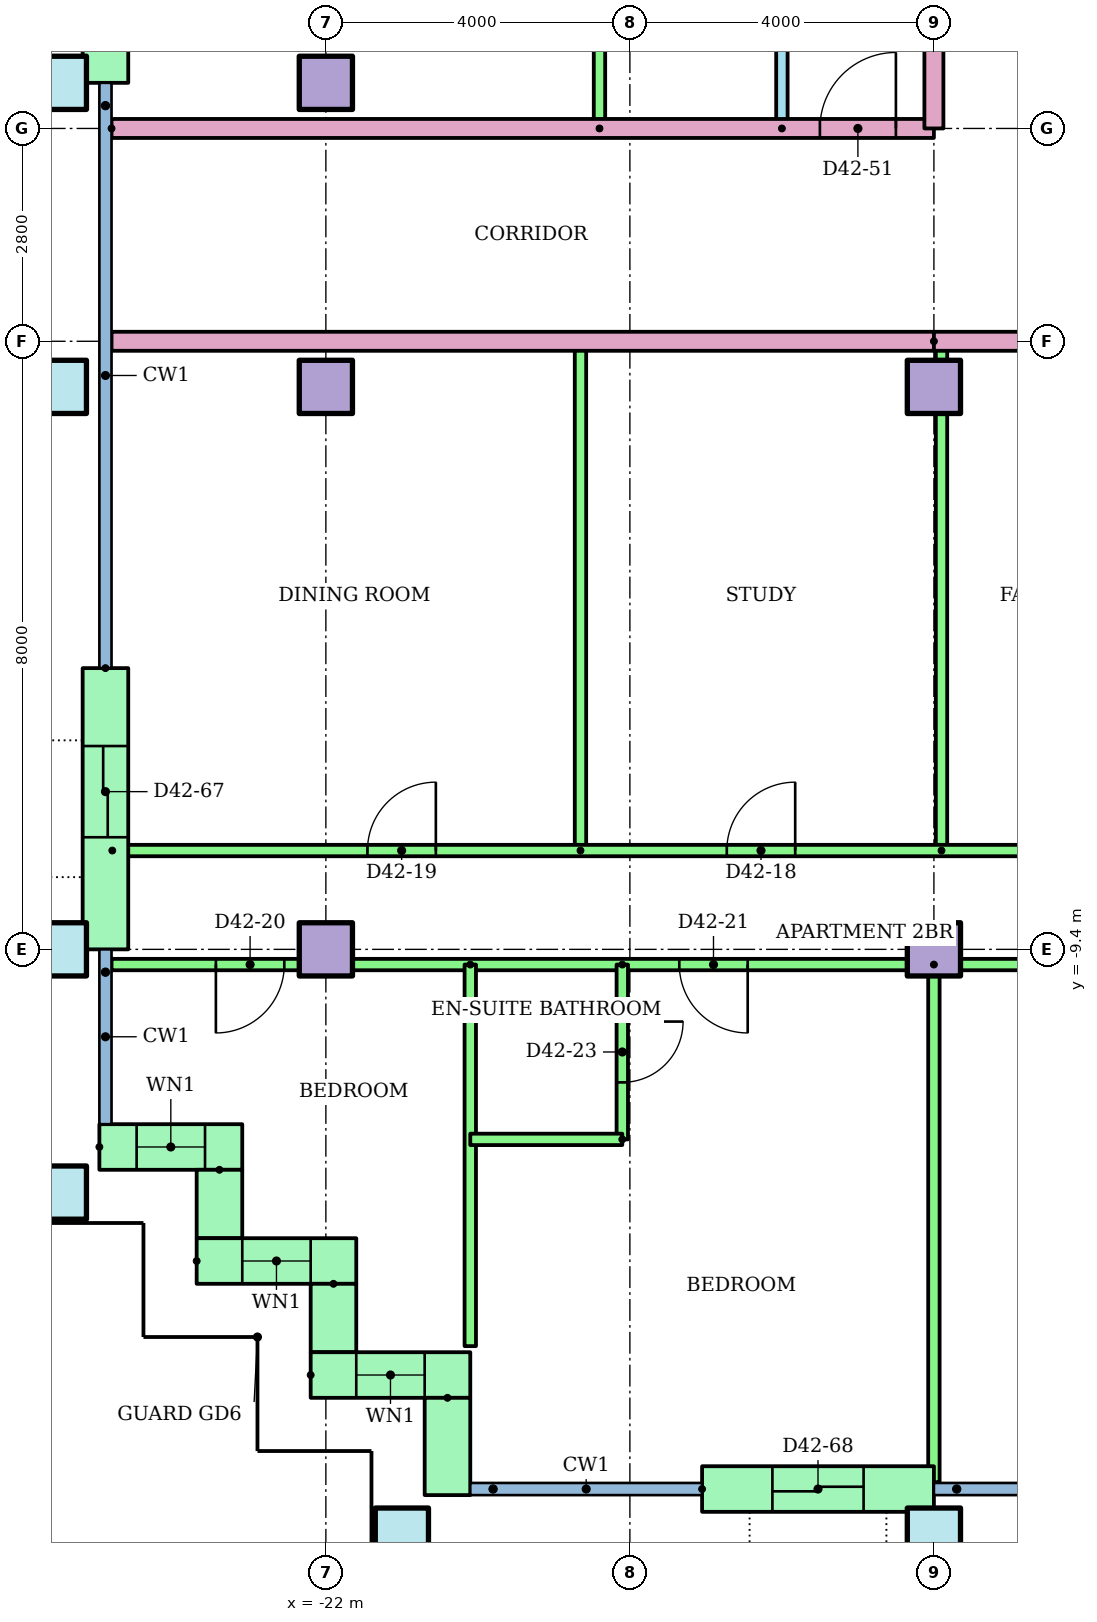
"""IFC4 building model, lengths in metres.
Left out: names, types, materials, properties, quantities, classifications, styles, units other than length and angle.
Written with IfcOpenShell. Run it as: python <this file> out.ifc"""

import sys

from ifc_helpers import new_model, si_unit, direction, frame, frame_2d, origin, origin_2d, place, context, subcontext, project, spatial, rectangle, hollow_rectangle, extrude, element, fill, save


model = new_model("IFC4")
c1 = context("Model", 3, precision=1e-05, world=origin(), true_north=direction((0.0, 1.0)))
c2 = subcontext(c1, "Body", "Model", "MODEL_VIEW")
j1 = project(units=[si_unit("LENGTHUNIT", "METRE"), si_unit("PLANEANGLEUNIT", "RADIAN")], contexts=[c1])
p1 = place(None, origin())
s1 = spatial("IfcSite", under=j1, at=p1, CompositionType="ELEMENT")
p2 = place(p1, origin())
s2 = spatial("IfcBuilding", under=s1, at=p2, CompositionType="ELEMENT")
p3 = place(p2, frame((0.0, 0.0, 165.3)))
s3 = spatial("IfcBuildingStorey", under=s2, at=p3, CompositionType="ELEMENT", Elevation=165.3)
for number, where in (
    (1, (-21.0, -17.1, 0.0)),
    (2, (-14.0, -17.1, 0.0)),
    (3, (-25.5, -12.6, 0.0)),
    (4, (-25.5, -9.4, 0.0)),
):
    element("IfcColumn", number, at=place(p3, frame(where)), inside=s3, PredefinedType="COLUMN", context=c2, shape_type="SweptSolid", body=[
        extrude(hollow_rectangle(XDim=0.7, YDim=0.7, WallThickness=0.036, at=origin_2d()), origin(), (0.0, 0.0, 1.0), 3.2),
    ])
for number, where in (
    (5, (-22.0, -9.4, 0.0)),
    (6, (-14.0, -9.4, 0.0)),
):
    element("IfcColumn", number, at=place(p3, frame(where)), inside=s3, PredefinedType="COLUMN", context=c2, shape_type="SweptSolid", body=[
        extrude(rectangle(XDim=0.7, YDim=0.7, at=origin_2d()), origin(), (0.0, 0.0, 1.0), 3.2),
    ])
p4 = place(p3, frame((-25.5, -2.0, 0.0)))
e7 = element("IfcColumn", 7, at=p4, inside=s3, PredefinedType="COLUMN", context=c2, shape_type="SweptSolid", body=[
    extrude(hollow_rectangle(XDim=0.7, YDim=0.7, WallThickness=0.036, at=origin_2d()), origin(), (0.0, 0.0, 1.0), 3.2),
])
for number, where in (
    (8, (-22.0, -2.0, 0.0)),
    (9, (-14.0, -2.0, 0.0)),
):
    element("IfcColumn", number, at=place(p3, frame(where)), inside=s3, PredefinedType="COLUMN", context=c2, shape_type="SweptSolid", body=[
        extrude(rectangle(XDim=0.7, YDim=0.7, at=origin_2d()), origin(), (0.0, 0.0, 1.0), 3.2),
    ])
p5 = place(p3, frame((-25.5, 2.0, 0.0)))
e10 = element("IfcColumn", 10, at=p5, inside=s3, PredefinedType="COLUMN", context=c2, shape_type="SweptSolid", body=[
    extrude(hollow_rectangle(XDim=0.7, YDim=0.7, WallThickness=0.036, at=origin_2d()), origin(), (0.0, 0.0, 1.0), 3.2),
])
p6 = place(p3, frame((-22.0, 2.0, 0.0)))
e11 = element("IfcColumn", 11, at=p6, inside=s3, PredefinedType="COLUMN", context=c2, shape_type="SweptSolid", body=[
    extrude(rectangle(XDim=0.7, YDim=0.7, at=origin_2d()), origin(), (0.0, 0.0, 1.0), 3.2),
])
p7 = place(p3, frame((-24.9, 6.5, 0.0), z_axis=(0.0, 0.0, 1.0), x_axis=(0.0, -1.0, 0.0)))
e12 = element("IfcWall", 12, at=p7, inside=s3, PredefinedType="STANDARD", context=c2, shape_type="SweptSolid", body=[
    extrude(rectangle(XDim=4.5, YDim=0.6, at=frame_2d((2.25, 0.0))), origin(), (0.0, 0.0, 1.0), 2.92),
])
p8 = place(p7, frame((1.65, 0.0, 0.0)))
e13 = element("IfcOpeningElement", 13, at=p8, cuts=e12, PredefinedType="OPENING", context=c2, shape_type="SweptSolid", body=[
    extrude(rectangle(XDim=1.2, YDim=2.1, at=frame_2d((0.6, 1.05))), frame((0.0, 0.31, 0.0), z_axis=(0.0, -1.0, 0.0), x_axis=(1.0, 0.0, 0.0)), (0.0, 0.0, 1.0), 0.62),
])
p9 = place(p3, frame((-24.9, -5.7, 0.0), z_axis=(0.0, 0.0, 1.0), x_axis=(0.0, -1.0, 0.0)))
e14 = element("IfcWall", 14, at=p9, inside=s3, PredefinedType="STANDARD", context=c2, shape_type="SweptSolid", body=[
    extrude(rectangle(XDim=3.7, YDim=0.6, at=frame_2d((1.85, 0.0))), origin(), (0.0, 0.0, 1.0), 2.92),
])
p10 = place(p9, frame((1.025, 0.0, 0.0)))
e15 = element("IfcOpeningElement", 15, at=p10, cuts=e14, PredefinedType="OPENING", context=c2, shape_type="SweptSolid", body=[
    extrude(rectangle(XDim=1.2, YDim=2.1, at=frame_2d((0.6, 1.05))), frame((0.0, 0.31, 0.0), z_axis=(0.0, -1.0, 0.0), x_axis=(1.0, 0.0, 0.0)), (0.0, 0.0, 1.0), 0.62),
])
p11 = place(p3, frame((-24.98, -12.0, 0.0)))
e16 = element("IfcWall", 16, at=p11, inside=s3, PredefinedType="STANDARD", context=c2, shape_type="SweptSolid", body=[
    extrude(rectangle(XDim=1.88, YDim=0.6, at=frame_2d((0.94, 0.0))), origin(), (0.0, 0.0, 1.0), 2.92),
])
p12 = place(p11, frame((0.49, 0.0, 0.9)))
e17 = element("IfcOpeningElement", 17, at=p12, cuts=e16, PredefinedType="OPENING", context=c2, shape_type="SweptSolid", body=[
    extrude(rectangle(XDim=0.9, YDim=1.5, at=frame_2d((0.45, 0.75))), frame((0.0, 0.31, 0.0), z_axis=(0.0, -1.0, 0.0), x_axis=(1.0, 0.0, 0.0)), (0.0, 0.0, 1.0), 0.62),
])
p13 = place(p3, frame((-23.4, -12.3, 0.0), z_axis=(0.0, 0.0, 1.0), x_axis=(0.0, -1.0, 0.0)))
e18 = element("IfcWall", 18, at=p13, inside=s3, PredefinedType="STANDARD", context=c2, shape_type="SweptSolid", body=[
    extrude(rectangle(XDim=0.9, YDim=0.6, at=frame_2d((0.45, 0.0))), origin(), (0.0, 0.0, 1.0), 2.92),
])
p14 = place(p3, frame((-23.7, -13.5, 0.0)))
e19 = element("IfcWall", 19, at=p14, inside=s3, PredefinedType="STANDARD", context=c2, shape_type="SweptSolid", body=[
    extrude(rectangle(XDim=2.1, YDim=0.6, at=frame_2d((1.05, 0.0))), origin(), (0.0, 0.0, 1.0), 2.92),
])
p15 = place(p14, frame((0.6, 0.0, 0.9)))
e20 = element("IfcOpeningElement", 20, at=p15, cuts=e19, PredefinedType="OPENING", context=c2, shape_type="SweptSolid", body=[
    extrude(rectangle(XDim=0.9, YDim=1.5, at=frame_2d((0.45, 0.75))), frame((0.0, 0.31, 0.0), z_axis=(0.0, -1.0, 0.0), x_axis=(1.0, 0.0, 0.0)), (0.0, 0.0, 1.0), 0.62),
])
p16 = place(p3, frame((-21.9, -13.8, 0.0), z_axis=(0.0, 0.0, 1.0), x_axis=(0.0, -1.0, 0.0)))
e21 = element("IfcWall", 21, at=p16, inside=s3, PredefinedType="STANDARD", context=c2, shape_type="SweptSolid", body=[
    extrude(rectangle(XDim=0.9, YDim=0.6, at=frame_2d((0.45, 0.0))), origin(), (0.0, 0.0, 1.0), 2.92),
])
p17 = place(p3, frame((-22.2, -15.0, 0.0)))
e22 = element("IfcWall", 22, at=p17, inside=s3, PredefinedType="STANDARD", context=c2, shape_type="SweptSolid", body=[
    extrude(rectangle(XDim=2.1, YDim=0.6, at=frame_2d((1.05, 0.0))), origin(), (0.0, 0.0, 1.0), 2.92),
])
p18 = place(p17, frame((0.6, 0.0, 0.9)))
e23 = element("IfcOpeningElement", 23, at=p18, cuts=e22, PredefinedType="OPENING", context=c2, shape_type="SweptSolid", body=[
    extrude(rectangle(XDim=0.9, YDim=1.5, at=frame_2d((0.45, 0.75))), frame((0.0, 0.31, 0.0), z_axis=(0.0, -1.0, 0.0), x_axis=(1.0, 0.0, 0.0)), (0.0, 0.0, 1.0), 0.62),
])
p19 = place(p3, frame((-20.4, -15.3, 0.0), z_axis=(0.0, 0.0, 1.0), x_axis=(0.0, -1.0, 0.0)))
e24 = element("IfcWall", 24, at=p19, inside=s3, PredefinedType="STANDARD", context=c2, shape_type="SweptSolid", body=[
    extrude(rectangle(XDim=1.28, YDim=0.6, at=frame_2d((0.64, 0.0))), origin(), (0.0, 0.0, 1.0), 2.92),
])
p20 = place(p3, frame((-17.05, -16.5, 0.0)))
e25 = element("IfcWall", 25, at=p20, inside=s3, PredefinedType="STANDARD", context=c2, shape_type="SweptSolid", body=[
    extrude(rectangle(XDim=3.05, YDim=0.6, at=frame_2d((1.525, 0.0))), origin(), (0.0, 0.0, 1.0), 2.92),
])
p21 = place(p20, frame((0.925, 0.0, 0.0)))
e26 = element("IfcOpeningElement", 26, at=p21, cuts=e25, PredefinedType="OPENING", context=c2, shape_type="SweptSolid", body=[
    extrude(rectangle(XDim=1.2, YDim=2.1, at=frame_2d((0.6, 1.05))), frame((0.0, 0.31, 0.0), z_axis=(0.0, -1.0, 0.0), x_axis=(1.0, 0.0, 0.0)), (0.0, 0.0, 1.0), 0.62),
])
for number, where, z_axis, x_axis in (
    (27, (-13.9, -8.1, 0.0), (0.0, 0.0, 1.0), (0.0, 1.0, 0.0)),
    (28, (-18.65, -8.1, 0.0), (0.0, 0.0, 1.0), (0.0, 1.0, 0.0)),
):
    element("IfcWall", number, at=place(p3, frame(where, z_axis=z_axis, x_axis=x_axis)), inside=s3, PredefinedType="PARTITIONING", context=c2, shape_type="SweptSolid", body=[
        extrude(rectangle(XDim=6.7, YDim=0.15, at=frame_2d((3.35, 0.0))), origin(), (0.0, 0.0, 1.0), 2.4),
    ])
p22 = place(p3, frame((-24.81, -8.1, 0.0)))
e29 = element("IfcWall", 29, at=p22, inside=s3, PredefinedType="PARTITIONING", context=c2, shape_type="SweptSolid", body=[
    extrude(rectangle(XDim=16.81, YDim=0.15, at=frame_2d((8.405, 0.0))), origin(), (0.0, 0.0, 1.0), 2.4),
])
p23 = place(p22, frame((12.21, 0.0, 0.0)))
e30 = element("IfcOpeningElement", 30, at=p23, cuts=e29, PredefinedType="OPENING", context=c2, shape_type="SweptSolid", body=[
    extrude(rectangle(XDim=0.9, YDim=2.1, at=frame_2d((0.45, 1.05))), frame((0.0, 0.085, 0.0), z_axis=(0.0, -1.0, 0.0), x_axis=(1.0, 0.0, 0.0)), (0.0, 0.0, 1.0), 0.17),
])
p24 = place(p22, frame((8.085, 0.0, 0.0)))
e31 = element("IfcOpeningElement", 31, at=p24, cuts=e29, PredefinedType="OPENING", context=c2, shape_type="SweptSolid", body=[
    extrude(rectangle(XDim=0.9, YDim=2.1, at=frame_2d((0.45, 1.05))), frame((0.0, 0.085, 0.0), z_axis=(0.0, -1.0, 0.0), x_axis=(1.0, 0.0, 0.0)), (0.0, 0.0, 1.0), 0.17),
])
p25 = place(p22, frame((3.357, 0.0, 0.0)))
e32 = element("IfcOpeningElement", 32, at=p25, cuts=e29, PredefinedType="OPENING", context=c2, shape_type="SweptSolid", body=[
    extrude(rectangle(XDim=0.9, YDim=2.1, at=frame_2d((0.45, 1.05))), frame((0.0, 0.085, 0.0), z_axis=(0.0, -1.0, 0.0), x_axis=(1.0, 0.0, 0.0)), (0.0, 0.0, 1.0), 0.17),
])
p26 = place(p3, frame((-6.0, -9.6, 0.0), z_axis=(0.0, 0.0, 1.0), x_axis=(-1.0, 0.0, 0.0)))
e33 = element("IfcWall", 33, at=p26, inside=s3, PredefinedType="PARTITIONING", context=c2, shape_type="SweptSolid", body=[
    extrude(rectangle(XDim=18.82, YDim=0.15, at=frame_2d((9.41, 0.0))), origin(), (0.0, 0.0, 1.0), 2.4),
])
p27 = place(p26, frame((16.547, 0.0, 0.0)))
e34 = element("IfcOpeningElement", 34, at=p27, cuts=e33, PredefinedType="OPENING", context=c2, shape_type="SweptSolid", body=[
    extrude(rectangle(XDim=0.9, YDim=2.1, at=frame_2d((0.45, 1.05))), frame((0.0, 0.085, 0.0), z_axis=(0.0, -1.0, 0.0), x_axis=(1.0, 0.0, 0.0)), (0.0, 0.0, 1.0), 0.17),
])
p28 = place(p26, frame((10.45, 0.0, 0.0)))
e35 = element("IfcOpeningElement", 35, at=p28, cuts=e33, PredefinedType="OPENING", context=c2, shape_type="SweptSolid", body=[
    extrude(rectangle(XDim=0.9, YDim=2.1, at=frame_2d((0.45, 1.05))), frame((0.0, 0.085, 0.0), z_axis=(0.0, -1.0, 0.0), x_axis=(1.0, 0.0, 0.0)), (0.0, 0.0, 1.0), 0.17),
])
p29 = place(p26, frame((3.5, 0.0, 0.0)))
e36 = element("IfcOpeningElement", 36, at=p29, cuts=e33, PredefinedType="OPENING", context=c2, shape_type="SweptSolid", body=[
    extrude(rectangle(XDim=1.0, YDim=2.1, at=frame_2d((0.5, 1.05))), frame((0.0, 0.085, 0.0), z_axis=(0.0, -1.0, 0.0), x_axis=(1.0, 0.0, 0.0)), (0.0, 0.0, 1.0), 0.17),
])
p30 = place(p3, frame((-20.1, -9.6, 0.0), z_axis=(0.0, 0.0, 1.0), x_axis=(0.0, -1.0, 0.0)))
e37 = element("IfcWall", 37, at=p30, inside=s3, PredefinedType="PARTITIONING", context=c2, shape_type="SweptSolid", body=[
    extrude(rectangle(XDim=5.02, YDim=0.15, at=frame_2d((2.51, 0.0))), origin(), (0.0, 0.0, 1.0), 2.4),
])
p31 = place(p3, frame((-14.0, -9.6, 0.0), z_axis=(0.0, 0.0, 1.0), x_axis=(0.0, -1.0, 0.0)))
e38 = element("IfcWall", 38, at=p31, inside=s3, PredefinedType="PARTITIONING", context=c2, shape_type="SweptSolid", body=[
    extrude(rectangle(XDim=6.81, YDim=0.15, at=frame_2d((3.405, 0.0))), origin(), (0.0, 0.0, 1.0), 2.4),
])
p32 = place(p3, frame((-18.1, -9.6, 0.0), z_axis=(0.0, 0.0, 1.0), x_axis=(0.0, -1.0, 0.0)))
e39 = element("IfcWall", 39, at=p32, inside=s3, PredefinedType="PARTITIONING", context=c2, shape_type="SweptSolid", body=[
    extrude(rectangle(XDim=2.3, YDim=0.15, at=frame_2d((1.15, 0.0))), origin(), (0.0, 0.0, 1.0), 2.4),
])
p33 = place(p32, frame((0.75, 0.0, 0.0)))
e40 = element("IfcOpeningElement", 40, at=p33, cuts=e39, PredefinedType="OPENING", context=c2, shape_type="SweptSolid", body=[
    extrude(rectangle(XDim=0.8, YDim=2.1, at=frame_2d((0.4, 1.05))), frame((0.0, 0.085, 0.0), z_axis=(0.0, -1.0, 0.0), x_axis=(1.0, 0.0, 0.0)), (0.0, 0.0, 1.0), 0.17),
])
p34 = place(p3, frame((-18.1, -11.9, 0.0), z_axis=(0.0, 0.0, 1.0), x_axis=(-1.0, 0.0, 0.0)))
e41 = element("IfcWall", 41, at=p34, inside=s3, PredefinedType="PARTITIONING", context=c2, shape_type="SweptSolid", body=[
    extrude(rectangle(XDim=2.0, YDim=0.15, at=frame_2d((1.0, 0.0))), origin(), (0.0, 0.0, 1.0), 2.4),
])
p35 = place(p3, frame((-14.0, -1.4, 0.0), z_axis=(0.0, 0.0, 1.0), x_axis=(-1.0, 0.0, 0.0)))
e42 = element("IfcWall", 42, at=p35, inside=s3, PredefinedType="PARTITIONING", context=c2, shape_type="SweptSolid", body=[
    extrude(rectangle(XDim=10.82, YDim=0.25, at=frame_2d((5.41, 0.0))), origin(), (0.0, 0.0, 1.0), 2.4),
])
p36 = place(p3, frame((-16.0, 1.4, 0.0), z_axis=(0.0, 0.0, 1.0), x_axis=(0.0, 1.0, 0.0)))
e43 = element("IfcWall", 43, at=p36, inside=s3, PredefinedType="PARTITIONING", context=c2, shape_type="SweptSolid", body=[
    extrude(rectangle(XDim=9.1, YDim=0.15, at=frame_2d((4.55, 0.0))), origin(), (0.0, 0.0, 1.0), 2.4),
])
p37 = place(p36, frame((2.05, 0.0, 0.0)))
e44 = element("IfcOpeningElement", 44, at=p37, cuts=e43, PredefinedType="OPENING", context=c2, shape_type="SweptSolid", body=[
    extrude(rectangle(XDim=0.9, YDim=2.1, at=frame_2d((0.45, 1.05))), frame((0.0, 0.085, 0.0), z_axis=(0.0, -1.0, 0.0), x_axis=(1.0, 0.0, 0.0)), (0.0, 0.0, 1.0), 0.17),
])
p38 = place(p36, frame((6.65, 0.0, 0.0)))
e45 = element("IfcOpeningElement", 45, at=p38, cuts=e43, PredefinedType="OPENING", context=c2, shape_type="SweptSolid", body=[
    extrude(rectangle(XDim=0.8, YDim=2.1, at=frame_2d((0.4, 1.05))), frame((0.0, 0.085, 0.0), z_axis=(0.0, -1.0, 0.0), x_axis=(1.0, 0.0, 0.0)), (0.0, 0.0, 1.0), 0.17),
])
p39 = place(p3, frame((-18.4, 1.4, 0.0), z_axis=(0.0, 0.0, 1.0), x_axis=(0.0, 1.0, 0.0)))
e46 = element("IfcWall", 46, at=p39, inside=s3, PredefinedType="PARTITIONING", context=c2, shape_type="SweptSolid", body=[
    extrude(rectangle(XDim=9.1, YDim=0.15, at=frame_2d((4.55, 0.0))), origin(), (0.0, 0.0, 1.0), 2.4),
])
p40 = place(p3, frame((-24.82, 1.4, 0.0)))
e47 = element("IfcWall", 47, at=p40, inside=s3, PredefinedType="PARTITIONING", context=c2, shape_type="SweptSolid", body=[
    extrude(rectangle(XDim=10.82, YDim=0.25, at=frame_2d((5.41, 0.0))), origin(), (0.0, 0.0, 1.0), 2.4),
])
p41 = place(p40, frame((9.32, 0.0, 0.0)))
e48 = element("IfcOpeningElement", 48, at=p41, cuts=e47, PredefinedType="OPENING", context=c2, shape_type="SweptSolid", body=[
    extrude(rectangle(XDim=1.0, YDim=2.1, at=frame_2d((0.5, 1.05))), frame((0.0, 0.135, 0.0), z_axis=(0.0, -1.0, 0.0), x_axis=(1.0, 0.0, 0.0)), (0.0, 0.0, 1.0), 0.27),
])
p42 = place(p3, frame((14.0, -1.4, 0.0), z_axis=(0.0, 0.0, 1.0), x_axis=(-1.0, 0.0, 0.0)))
e49 = element("IfcWall", 49, at=p42, inside=s3, PredefinedType="PARTITIONING", context=c2, shape_type="SweptSolid", body=[
    extrude(rectangle(XDim=28.0, YDim=0.25, at=frame_2d((14.0, 0.0))), origin(), (0.0, 0.0, 1.0), 2.4),
])
p43 = place(p42, frame((20.547, 0.0, 0.0)))
e50 = element("IfcOpeningElement", 50, at=p43, cuts=e49, PredefinedType="OPENING", context=c2, shape_type="SweptSolid", body=[
    extrude(rectangle(XDim=1.0, YDim=2.1, at=frame_2d((0.5, 1.05))), frame((0.0, 0.135, 0.0), z_axis=(0.0, -1.0, 0.0), x_axis=(1.0, 0.0, 0.0)), (0.0, 0.0, 1.0), 0.27),
])
p44 = place(p42, frame((18.453, 0.0, 0.0)))
e51 = element("IfcOpeningElement", 51, at=p44, cuts=e49, PredefinedType="OPENING", context=c2, shape_type="SweptSolid", body=[
    extrude(rectangle(XDim=1.0, YDim=2.1, at=frame_2d((0.5, 1.05))), frame((0.0, 0.135, 0.0), z_axis=(0.0, -1.0, 0.0), x_axis=(1.0, 0.0, 0.0)), (0.0, 0.0, 1.0), 0.27),
])
p45 = place(p42, frame((2.453, 0.0, 0.0)))
e52 = element("IfcOpeningElement", 52, at=p45, cuts=e49, PredefinedType="OPENING", context=c2, shape_type="SweptSolid", body=[
    extrude(rectangle(XDim=1.0, YDim=2.1, at=frame_2d((0.5, 1.05))), frame((0.0, 0.135, 0.0), z_axis=(0.0, -1.0, 0.0), x_axis=(1.0, 0.0, 0.0)), (0.0, 0.0, 1.0), 0.27),
])
p46 = place(p3, frame((-14.0, 3.0, 0.0), z_axis=(0.0, 0.0, 1.0), x_axis=(0.0, -1.0, 0.0)))
e53 = element("IfcWall", 53, at=p46, inside=s3, PredefinedType="PARTITIONING", context=c2, shape_type="SweptSolid", body=[
    extrude(rectangle(XDim=1.6, YDim=0.25, at=frame_2d((0.8, 0.0))), origin(), (0.0, 0.0, 1.0), 2.4),
])
p47 = place(p12, origin())
e54 = element("IfcWindow", 54, at=p47, inside=s3, PartitioningType="SINGLE_PANEL", PredefinedType="WINDOW", context=c2, shape_type="SweptSolid", body=[
    extrude(rectangle(XDim=0.9, YDim=1.5, at=frame_2d((0.45, 0.75))), frame((0.0, 0.03, 0.0), z_axis=(0.0, -1.0, 0.0), x_axis=(1.0, 0.0, 0.0)), (0.0, 0.0, 1.0), 0.06),
])
fill(e17, e54)
p48 = place(p15, origin())
e55 = element("IfcWindow", 55, at=p48, inside=s3, PartitioningType="SINGLE_PANEL", PredefinedType="WINDOW", context=c2, shape_type="SweptSolid", body=[
    extrude(rectangle(XDim=0.9, YDim=1.5, at=frame_2d((0.45, 0.75))), frame((0.0, 0.03, 0.0), z_axis=(0.0, -1.0, 0.0), x_axis=(1.0, 0.0, 0.0)), (0.0, 0.0, 1.0), 0.06),
])
fill(e20, e55)
p49 = place(p18, origin())
e56 = element("IfcWindow", 56, at=p49, inside=s3, PartitioningType="SINGLE_PANEL", PredefinedType="WINDOW", context=c2, shape_type="SweptSolid", body=[
    extrude(rectangle(XDim=0.9, YDim=1.5, at=frame_2d((0.45, 0.75))), frame((0.0, 0.03, 0.0), z_axis=(0.0, -1.0, 0.0), x_axis=(1.0, 0.0, 0.0)), (0.0, 0.0, 1.0), 0.06),
])
fill(e23, e56)
p50 = place(p24, origin())
e57 = element("IfcDoor", 57, at=p50, inside=s3, OperationType="SINGLE_SWING_RIGHT", PredefinedType="DOOR", context=c2, shape_type="SweptSolid", body=[
    extrude(rectangle(XDim=0.9, YDim=2.1, at=frame_2d((0.45, 1.05))), frame((0.0, 0.025, 0.0), z_axis=(0.0, -1.0, 0.0), x_axis=(1.0, 0.0, 0.0)), (0.0, 0.0, 1.0), 0.05),
])
fill(e31, e57)
p51 = place(p25, origin())
e58 = element("IfcDoor", 58, at=p51, inside=s3, OperationType="SINGLE_SWING_RIGHT", PredefinedType="DOOR", context=c2, shape_type="SweptSolid", body=[
    extrude(rectangle(XDim=0.9, YDim=2.1, at=frame_2d((0.45, 1.05))), frame((0.0, 0.025, 0.0), z_axis=(0.0, -1.0, 0.0), x_axis=(1.0, 0.0, 0.0)), (0.0, 0.0, 1.0), 0.05),
])
fill(e32, e58)
p52 = place(p27, origin())
e59 = element("IfcDoor", 59, at=p52, inside=s3, OperationType="SINGLE_SWING_RIGHT", PredefinedType="DOOR", context=c2, shape_type="SweptSolid", body=[
    extrude(rectangle(XDim=0.9, YDim=2.1, at=frame_2d((0.45, 1.05))), frame((0.0, 0.025, 0.0), z_axis=(0.0, -1.0, 0.0), x_axis=(1.0, 0.0, 0.0)), (0.0, 0.0, 1.0), 0.05),
])
fill(e34, e59)
p53 = place(p28, origin())
e60 = element("IfcDoor", 60, at=p53, inside=s3, OperationType="SINGLE_SWING_LEFT", PredefinedType="DOOR", context=c2, shape_type="SweptSolid", body=[
    extrude(rectangle(XDim=0.9, YDim=2.1, at=frame_2d((0.45, 1.05))), frame((0.0, 0.025, 0.0), z_axis=(0.0, -1.0, 0.0), x_axis=(1.0, 0.0, 0.0)), (0.0, 0.0, 1.0), 0.05),
])
fill(e35, e60)
p54 = place(p33, origin())
e61 = element("IfcDoor", 61, at=p54, inside=s3, OperationType="SINGLE_SWING_LEFT", PredefinedType="DOOR", context=c2, shape_type="SweptSolid", body=[
    extrude(rectangle(XDim=0.8, YDim=2.1, at=frame_2d((0.4, 1.05))), frame((0.0, 0.025, 0.0), z_axis=(0.0, -1.0, 0.0), x_axis=(1.0, 0.0, 0.0)), (0.0, 0.0, 1.0), 0.05),
])
fill(e40, e61)
p55 = place(p41, origin())
e62 = element("IfcDoor", 62, at=p55, inside=s3, OperationType="SINGLE_SWING_RIGHT", PredefinedType="DOOR", context=c2, shape_type="SweptSolid", body=[
    extrude(rectangle(XDim=1.0, YDim=2.1, at=frame_2d((0.5, 1.05))), frame((0.0, 0.025, 0.0), z_axis=(0.0, -1.0, 0.0), x_axis=(1.0, 0.0, 0.0)), (0.0, 0.0, 1.0), 0.05),
])
fill(e48, e62)
p56 = place(p10, origin())
e63 = element("IfcDoor", 63, at=p56, inside=s3, OperationType="SLIDING_TO_LEFT", PredefinedType="DOOR", context=c2, shape_type="SweptSolid", body=[
    extrude(rectangle(XDim=1.2, YDim=2.1, at=frame_2d((0.6, 1.05))), frame((0.0, 0.025, 0.0), z_axis=(0.0, -1.0, 0.0), x_axis=(1.0, 0.0, 0.0)), (0.0, 0.0, 1.0), 0.05),
])
fill(e15, e63)
p57 = place(p21, origin())
e64 = element("IfcDoor", 64, at=p57, inside=s3, OperationType="SLIDING_TO_LEFT", PredefinedType="DOOR", context=c2, shape_type="SweptSolid", body=[
    extrude(rectangle(XDim=1.2, YDim=2.1, at=frame_2d((0.6, 1.05))), frame((0.0, 0.025, 0.0), z_axis=(0.0, -1.0, 0.0), x_axis=(1.0, 0.0, 0.0)), (0.0, 0.0, 1.0), 0.05),
])
fill(e26, e64)
save(model, sys.argv[1])
